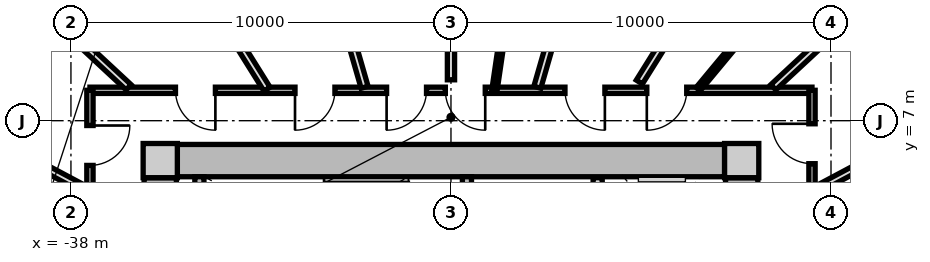
"""IFC4 building model, lengths in metres.
Left out: names, types, materials, properties, quantities, classifications, styles, units other than length and angle.
Written with IfcOpenShell. Run it as: python <this file> out.ifc"""

import sys

from ifc_helpers import new_model, si_unit, direction, frame, frame_2d, origin, origin_2d, place, context, subcontext, project, spatial, rectangle, extrude, source, transform, mapped, element, fill, save


model = new_model("IFC4")
c1 = context("Model", 3, precision=1e-05, world=origin(), true_north=direction((0.0, 1.0)))
c2 = subcontext(c1, "Body", "Model", "MODEL_VIEW")
j1 = project(units=[si_unit("LENGTHUNIT", "METRE"), si_unit("PLANEANGLEUNIT", "RADIAN")], contexts=[c1])
p1 = place(None, origin())
s1 = spatial("IfcSite", under=j1, at=p1, CompositionType="ELEMENT")
p2 = place(p1, origin())
s2 = spatial("IfcBuilding", under=s1, at=p2, CompositionType="ELEMENT")
p3 = place(p2, frame((0.0, 0.0, 55.15)))
s3 = spatial("IfcBuildingStorey", under=s2, at=p3, CompositionType="ELEMENT", Elevation=55.15)
m1 = source(origin(), c2, "Body", "SweptSolid", [
    extrude(rectangle(XDim=0.9, YDim=0.9, at=origin_2d()), origin(), (0.0, 0.0, 1.0), 3.05),
])
for number, where, z_axis, x_axis in (
    (1, (-20.35, 5.95, 0.0), (0.0, 0.0, 1.0), (1.0, 0.0, 0.0)),
    (2, (-35.65, 5.95, 0.0), (0.0, 0.0, 1.0), (1.0, 0.0, 0.0)),
):
    element("IfcColumn", number, at=place(p3, frame(where, z_axis=z_axis, x_axis=x_axis)), inside=s3, PredefinedType="COLUMN", context=c2, shape_type="MappedRepresentation", body=[
        mapped(m1, transform((0.0, 0.0, 0.0), x_axis=(1.0, 0.0, 0.0), y_axis=(0.0, 1.0, 0.0), z_axis=(0.0, 0.0, 1.0), scale=1.0)),
    ])
m2 = source(origin(), c2, "Body", "SweptSolid", [
    extrude(rectangle(XDim=14.4, YDim=0.85, at=frame_2d((7.2, 0.0))), origin(), (0.0, 0.0, 1.0), 2.79),
])
p4 = place(p3, frame((-35.2, 5.95, 0.0), z_axis=(0.0, 0.0, 1.0), x_axis=(1.0, 0.0, 0.0)))
e3 = element("IfcWall", 3, at=p4, inside=s3, PredefinedType="SHEAR", context=c2, shape_type="MappedRepresentation", body=[
    mapped(m2, transform((0.0, 0.0, 0.0), x_axis=(1.0, 0.0, 0.0), y_axis=(0.0, 1.0, 0.0), z_axis=(0.0, 0.0, 1.0), scale=1.0)),
])
m3 = source(origin(), c2, "Body", "SweptSolid", [
    extrude(rectangle(XDim=11.0, YDim=0.85, at=frame_2d((5.5, 0.0))), origin(), (0.0, 0.0, 1.0), 2.79),
])
p5 = place(p3, frame((-35.65, -5.5, 0.0), z_axis=(0.0, 0.0, 1.0), x_axis=(0.0, 1.0, 0.0)))
e4 = element("IfcWall", 4, at=p5, inside=s3, PredefinedType="SHEAR", context=c2, shape_type="MappedRepresentation", body=[
    mapped(m3, transform((0.0, 0.0, 0.0), x_axis=(1.0, 0.0, 0.0), y_axis=(0.0, 1.0, 0.0), z_axis=(0.0, 0.0, 1.0), scale=1.0)),
])
p6 = place(p5, frame((3.8, 0.0, 0.0)))
e5 = element("IfcOpeningElement", 5, at=p6, cuts=e4, PredefinedType="OPENING", context=c2, shape_type="SweptSolid", body=[
    extrude(rectangle(XDim=1.2, YDim=2.15, at=frame_2d((0.6, 1.075))), frame((0.0, 0.435, 0.0), z_axis=(0.0, -1.0, 0.0), x_axis=(1.0, 0.0, 0.0)), (0.0, 0.0, 1.0), 0.87),
])
p7 = place(p3, frame((-20.35, 5.5, 0.0), z_axis=(0.0, 0.0, 1.0), x_axis=(0.0, -1.0, 0.0)))
e6 = element("IfcWall", 6, at=p7, inside=s3, PredefinedType="SHEAR", context=c2, shape_type="MappedRepresentation", body=[
    mapped(m3, transform((0.0, 0.0, 0.0), x_axis=(1.0, 0.0, 0.0), y_axis=(0.0, 1.0, 0.0), z_axis=(0.0, 0.0, 1.0), scale=1.0)),
])
p8 = place(p7, frame((5.65, 0.0, 0.0)))
e7 = element("IfcOpeningElement", 7, at=p8, cuts=e6, PredefinedType="OPENING", context=c2, shape_type="SweptSolid", body=[
    extrude(rectangle(XDim=1.2, YDim=2.15, at=frame_2d((0.6, 1.075))), frame((0.0, 0.435, 0.0), z_axis=(0.0, -1.0, 0.0), x_axis=(1.0, 0.0, 0.0)), (0.0, 0.0, 1.0), 0.87),
])
p9 = place(p7, frame((9.3, 0.0, 0.0)))
e8 = element("IfcOpeningElement", 8, at=p9, cuts=e6, PredefinedType="OPENING", context=c2, shape_type="SweptSolid", body=[
    extrude(rectangle(XDim=1.0, YDim=2.1, at=frame_2d((0.5, 1.05))), frame((0.0, 0.435, 0.0), z_axis=(0.0, -1.0, 0.0), x_axis=(1.0, 0.0, 0.0)), (0.0, 0.0, 1.0), 0.87),
])
m4 = source(origin(), c2, "Body", "SweptSolid", [
    extrude(rectangle(XDim=3.075, YDim=0.24, at=frame_2d((1.538, 0.0))), origin(), (0.0, 0.0, 1.0), 2.79),
])
p10 = place(p3, frame((-34.62, 2.45, 0.0), z_axis=(0.0, 0.0, 1.0), x_axis=(0.0, 1.0, 0.0)))
e9 = element("IfcWall", 9, at=p10, inside=s3, PredefinedType="PARTITIONING", context=c2, shape_type="MappedRepresentation", body=[
    mapped(m4, transform((0.0, 0.0, 0.0), x_axis=(1.0, 0.0, 0.0), y_axis=(0.0, 1.0, 0.0), z_axis=(0.0, 0.0, 1.0), scale=1.0)),
])
p11 = place(p3, frame((-27.58, 2.45, 0.0), z_axis=(0.0, 0.0, 1.0), x_axis=(0.0, 1.0, 0.0)))
e10 = element("IfcWall", 10, at=p11, inside=s3, PredefinedType="PARTITIONING", context=c2, shape_type="MappedRepresentation", body=[
    mapped(m4, transform((0.0, 0.0, 0.0), x_axis=(1.0, 0.0, 0.0), y_axis=(0.0, 1.0, 0.0), z_axis=(0.0, 0.0, 1.0), scale=1.0)),
])
p12 = place(p11, frame((0.55, 0.0, 0.0)))
e11 = element("IfcOpeningElement", 11, at=p12, cuts=e10, PredefinedType="OPENING", context=c2, shape_type="SweptSolid", body=[
    extrude(rectangle(XDim=1.1, YDim=2.15, at=frame_2d((0.55, 1.075))), frame((0.0, 0.13, 0.0), z_axis=(0.0, -1.0, 0.0), x_axis=(1.0, 0.0, 0.0)), (0.0, 0.0, 1.0), 0.26),
])
m5 = source(origin(), c2, "Body", "SweptSolid", [
    extrude(rectangle(XDim=5.0, YDim=0.24, at=frame_2d((2.5, 0.0))), origin(), (0.0, 0.0, 1.0), 2.775),
])
p13 = place(p3, frame((-24.14, 0.5, 0.0), z_axis=(0.0, 0.0, 1.0), x_axis=(0.0, 1.0, 0.0)))
e12 = element("IfcWall", 12, at=p13, inside=s3, PredefinedType="PARTITIONING", context=c2, shape_type="MappedRepresentation", body=[
    mapped(m5, transform((0.0, 0.0, 0.0), x_axis=(1.0, 0.0, 0.0), y_axis=(0.0, 1.0, 0.0), z_axis=(0.0, 0.0, 1.0), scale=1.0)),
])
p14 = place(p13, frame((3.05, 0.0, 0.0)))
e13 = element("IfcOpeningElement", 13, at=p14, cuts=e12, PredefinedType="OPENING", context=c2, shape_type="SweptSolid", body=[
    extrude(rectangle(XDim=1.3, YDim=2.2, at=frame_2d((0.65, 1.1))), frame((0.0, 0.13, 0.0), z_axis=(0.0, -1.0, 0.0), x_axis=(1.0, 0.0, 0.0)), (0.0, 0.0, 1.0), 0.26),
])
p15 = place(p13, frame((0.55, 0.0, 0.0)))
e14 = element("IfcOpeningElement", 14, at=p15, cuts=e12, PredefinedType="OPENING", context=c2, shape_type="SweptSolid", body=[
    extrude(rectangle(XDim=1.3, YDim=2.2, at=frame_2d((0.65, 1.1))), frame((0.0, 0.13, 0.0), z_axis=(0.0, -1.0, 0.0), x_axis=(1.0, 0.0, 0.0)), (0.0, 0.0, 1.0), 0.26),
])
m6 = source(origin(), c2, "Body", "SweptSolid", [
    extrude(rectangle(XDim=19.0, YDim=0.165, at=frame_2d((9.5, 0.0))), origin(), (0.0, 0.0, 1.0), 2.775),
])
p16 = place(p3, frame((-37.5, 7.8, 0.0), z_axis=(0.0, 0.0, 1.0), x_axis=(1.0, 0.0, 0.0)))
e15 = element("IfcWall", 15, at=p16, inside=s3, PredefinedType="PARTITIONING", context=c2, shape_type="MappedRepresentation", body=[
    mapped(m6, transform((0.0, 0.0, 0.0), x_axis=(1.0, 0.0, 0.0), y_axis=(0.0, 1.0, 0.0), z_axis=(0.0, 0.0, 1.0), scale=1.0)),
])
p17 = place(p16, frame((14.653, 0.0, 0.0)))
e16 = element("IfcOpeningElement", 16, at=p17, cuts=e15, PredefinedType="OPENING", context=c2, shape_type="SweptSolid", body=[
    extrude(rectangle(XDim=1.05, YDim=2.15, at=frame_2d((0.525, 1.075))), frame((0.0, 0.093, 0.0), z_axis=(0.0, -1.0, 0.0), x_axis=(1.0, 0.0, 0.0)), (0.0, 0.0, 1.0), 0.185),
])
p18 = place(p16, frame((12.5, 0.0, 0.0)))
e17 = element("IfcOpeningElement", 17, at=p18, cuts=e15, PredefinedType="OPENING", context=c2, shape_type="SweptSolid", body=[
    extrude(rectangle(XDim=1.05, YDim=2.15, at=frame_2d((0.525, 1.075))), frame((0.0, 0.093, 0.0), z_axis=(0.0, -1.0, 0.0), x_axis=(1.0, 0.0, 0.0)), (0.0, 0.0, 1.0), 0.185),
])
p19 = place(p16, frame((9.352, 0.0, 0.0)))
e18 = element("IfcOpeningElement", 18, at=p19, cuts=e15, PredefinedType="OPENING", context=c2, shape_type="SweptSolid", body=[
    extrude(rectangle(XDim=1.05, YDim=2.15, at=frame_2d((0.525, 1.075))), frame((0.0, 0.093, 0.0), z_axis=(0.0, -1.0, 0.0), x_axis=(1.0, 0.0, 0.0)), (0.0, 0.0, 1.0), 0.185),
])
p20 = place(p16, frame((7.806, 0.0, 0.0)))
e19 = element("IfcOpeningElement", 19, at=p20, cuts=e15, PredefinedType="OPENING", context=c2, shape_type="SweptSolid", body=[
    extrude(rectangle(XDim=1.05, YDim=2.15, at=frame_2d((0.525, 1.075))), frame((0.0, 0.093, 0.0), z_axis=(0.0, -1.0, 0.0), x_axis=(1.0, 0.0, 0.0)), (0.0, 0.0, 1.0), 0.185),
])
p21 = place(p16, frame((5.396, 0.0, 0.0)))
e20 = element("IfcOpeningElement", 20, at=p21, cuts=e15, PredefinedType="OPENING", context=c2, shape_type="SweptSolid", body=[
    extrude(rectangle(XDim=1.05, YDim=2.15, at=frame_2d((0.525, 1.075))), frame((0.0, 0.093, 0.0), z_axis=(0.0, -1.0, 0.0), x_axis=(1.0, 0.0, 0.0)), (0.0, 0.0, 1.0), 0.185),
])
p22 = place(p16, frame((2.251, 0.0, 0.0)))
e21 = element("IfcOpeningElement", 21, at=p22, cuts=e15, PredefinedType="OPENING", context=c2, shape_type="SweptSolid", body=[
    extrude(rectangle(XDim=1.05, YDim=2.15, at=frame_2d((0.525, 1.075))), frame((0.0, 0.093, 0.0), z_axis=(0.0, -1.0, 0.0), x_axis=(1.0, 0.0, 0.0)), (0.0, 0.0, 1.0), 0.185),
])
m7 = source(origin(), c2, "Body", "SweptSolid", [
    extrude(rectangle(XDim=15.6, YDim=0.165, at=frame_2d((7.8, 0.0))), origin(), (0.0, 0.0, 1.0), 2.775),
])
p23 = place(p3, frame((-37.5, -7.8, 0.0), z_axis=(0.0, 0.0, 1.0), x_axis=(0.0, 1.0, 0.0)))
e22 = element("IfcWall", 22, at=p23, inside=s3, PredefinedType="PARTITIONING", context=c2, shape_type="MappedRepresentation", body=[
    mapped(m7, transform((0.0, 0.0, 0.0), x_axis=(1.0, 0.0, 0.0), y_axis=(0.0, 1.0, 0.0), z_axis=(0.0, 0.0, 1.0), scale=1.0)),
])
p24 = place(p23, frame((13.623, 0.0, 0.0)))
e23 = element("IfcOpeningElement", 23, at=p24, cuts=e22, PredefinedType="OPENING", context=c2, shape_type="SweptSolid", body=[
    extrude(rectangle(XDim=1.05, YDim=2.15, at=frame_2d((0.525, 1.075))), frame((0.0, 0.093, 0.0), z_axis=(0.0, -1.0, 0.0), x_axis=(1.0, 0.0, 0.0)), (0.0, 0.0, 1.0), 0.185),
])
p25 = place(p23, frame((11.018, 0.0, 0.0)))
e24 = element("IfcOpeningElement", 24, at=p25, cuts=e22, PredefinedType="OPENING", context=c2, shape_type="SweptSolid", body=[
    extrude(rectangle(XDim=1.05, YDim=2.15, at=frame_2d((0.525, 1.075))), frame((0.0, 0.093, 0.0), z_axis=(0.0, -1.0, 0.0), x_axis=(1.0, 0.0, 0.0)), (0.0, 0.0, 1.0), 0.185),
])
p26 = place(p23, frame((8.467, 0.0, 0.0)))
e25 = element("IfcOpeningElement", 25, at=p26, cuts=e22, PredefinedType="OPENING", context=c2, shape_type="SweptSolid", body=[
    extrude(rectangle(XDim=1.05, YDim=2.15, at=frame_2d((0.525, 1.075))), frame((0.0, 0.093, 0.0), z_axis=(0.0, -1.0, 0.0), x_axis=(1.0, 0.0, 0.0)), (0.0, 0.0, 1.0), 0.185),
])
p27 = place(p23, frame((6.035, 0.0, 0.0)))
e26 = element("IfcOpeningElement", 26, at=p27, cuts=e22, PredefinedType="OPENING", context=c2, shape_type="SweptSolid", body=[
    extrude(rectangle(XDim=1.05, YDim=2.15, at=frame_2d((0.525, 1.075))), frame((0.0, 0.093, 0.0), z_axis=(0.0, -1.0, 0.0), x_axis=(1.0, 0.0, 0.0)), (0.0, 0.0, 1.0), 0.185),
])
p28 = place(p23, frame((3.489, 0.0, 0.0)))
e27 = element("IfcOpeningElement", 27, at=p28, cuts=e22, PredefinedType="OPENING", context=c2, shape_type="SweptSolid", body=[
    extrude(rectangle(XDim=1.05, YDim=2.15, at=frame_2d((0.525, 1.075))), frame((0.0, 0.093, 0.0), z_axis=(0.0, -1.0, 0.0), x_axis=(1.0, 0.0, 0.0)), (0.0, 0.0, 1.0), 0.185),
])
p29 = place(p23, frame((0.882, 0.0, 0.0)))
e28 = element("IfcOpeningElement", 28, at=p29, cuts=e22, PredefinedType="OPENING", context=c2, shape_type="SweptSolid", body=[
    extrude(rectangle(XDim=1.05, YDim=2.15, at=frame_2d((0.525, 1.075))), frame((0.0, 0.093, 0.0), z_axis=(0.0, -1.0, 0.0), x_axis=(1.0, 0.0, 0.0)), (0.0, 0.0, 1.0), 0.185),
])
p30 = place(p3, frame((-18.5, 7.8, 0.0), z_axis=(0.0, 0.0, 1.0), x_axis=(0.0, -1.0, 0.0)))
e29 = element("IfcWall", 29, at=p30, inside=s3, PredefinedType="PARTITIONING", context=c2, shape_type="MappedRepresentation", body=[
    mapped(m7, transform((0.0, 0.0, 0.0), x_axis=(1.0, 0.0, 0.0), y_axis=(0.0, 1.0, 0.0), z_axis=(0.0, 0.0, 1.0), scale=1.0)),
])
p31 = place(p30, frame((12.141, 0.0, 0.0)))
e30 = element("IfcOpeningElement", 30, at=p31, cuts=e29, PredefinedType="OPENING", context=c2, shape_type="SweptSolid", body=[
    extrude(rectangle(XDim=1.25, YDim=2.2, at=frame_2d((0.625, 1.1))), frame((0.0, 0.093, 0.0), z_axis=(0.0, -1.0, 0.0), x_axis=(1.0, 0.0, 0.0)), (0.0, 0.0, 1.0), 0.185),
])
p32 = place(p30, frame((7.175, 0.0, 0.0)))
e31 = element("IfcOpeningElement", 31, at=p32, cuts=e29, PredefinedType="OPENING", context=c2, shape_type="SweptSolid", body=[
    extrude(rectangle(XDim=1.25, YDim=2.2, at=frame_2d((0.625, 1.1))), frame((0.0, 0.093, 0.0), z_axis=(0.0, -1.0, 0.0), x_axis=(1.0, 0.0, 0.0)), (0.0, 0.0, 1.0), 0.185),
])
p33 = place(p30, frame((2.826, 0.0, 0.0)))
e32 = element("IfcOpeningElement", 32, at=p33, cuts=e29, PredefinedType="OPENING", context=c2, shape_type="SweptSolid", body=[
    extrude(rectangle(XDim=1.05, YDim=2.15, at=frame_2d((0.525, 1.075))), frame((0.0, 0.093, 0.0), z_axis=(0.0, -1.0, 0.0), x_axis=(1.0, 0.0, 0.0)), (0.0, 0.0, 1.0), 0.185),
])
p34 = place(p30, frame((0.881, 0.0, 0.0)))
e33 = element("IfcOpeningElement", 33, at=p34, cuts=e29, PredefinedType="OPENING", context=c2, shape_type="SweptSolid", body=[
    extrude(rectangle(XDim=1.05, YDim=2.15, at=frame_2d((0.525, 1.075))), frame((0.0, 0.093, 0.0), z_axis=(0.0, -1.0, 0.0), x_axis=(1.0, 0.0, 0.0)), (0.0, 0.0, 1.0), 0.185),
])
m8 = source(origin(), c2, "Body", "SweptSolid", [
    extrude(rectangle(XDim=7.435, YDim=0.19, at=frame_2d((3.717, 0.0))), origin(), (0.0, 0.0, 1.0), 2.225),
])
p35 = place(p3, frame((-36.483, 7.88, 0.0), z_axis=(0.0, 0.0, 1.0), x_axis=(-0.732651956848, 0.680603489652, 0.0)))
e34 = element("IfcWall", 34, at=p35, inside=s3, PredefinedType="PARTITIONING", context=c2, shape_type="MappedRepresentation", body=[
    mapped(m8, transform((0.0, 0.0, 0.0), x_axis=(1.0, 0.0, 0.0), y_axis=(0.0, 1.0, 0.0), z_axis=(0.0, 0.0, 1.0), scale=1.0)),
])
m9 = source(origin(), c2, "Body", "SweptSolid", [
    extrude(rectangle(XDim=7.873, YDim=0.19, at=frame_2d((3.937, 0.0))), origin(), (0.0, 0.0, 1.0), 2.775),
])
p36 = place(p3, frame((-37.53, 5.138, 0.0), z_axis=(0.0, 0.0, 1.0), x_axis=(-0.882666052726, 0.470000680175, 0.0)))
e35 = element("IfcWall", 35, at=p36, inside=s3, PredefinedType="PARTITIONING", context=c2, shape_type="MappedRepresentation", body=[
    mapped(m9, transform((0.0, 0.0, 0.0), x_axis=(1.0, 0.0, 0.0), y_axis=(0.0, 1.0, 0.0), z_axis=(0.0, 0.0, 1.0), scale=1.0)),
])
p37 = place(p3, frame((-19.517, 7.88, 0.0), z_axis=(0.0, 0.0, 1.0), x_axis=(0.732651956848, 0.680603489652, 0.0)))
e36 = element("IfcWall", 36, at=p37, inside=s3, PredefinedType="PARTITIONING", context=c2, shape_type="MappedRepresentation", body=[
    mapped(m8, transform((0.0, 0.0, 0.0), x_axis=(1.0, 0.0, 0.0), y_axis=(0.0, 1.0, 0.0), z_axis=(0.0, 0.0, 1.0), scale=1.0)),
])
m10 = source(origin(), c2, "Body", "SweptSolid", [
    extrude(rectangle(XDim=7.677, YDim=0.19, at=frame_2d((3.838, 0.0))), origin(), (0.0, 0.0, 1.0), 2.775),
])
p38 = place(p3, frame((-18.297, 5.231, 0.0), z_axis=(0.0, 0.0, 1.0), x_axis=(0.882725057546, 0.469889851753, 0.0)))
e37 = element("IfcWall", 37, at=p38, inside=s3, PredefinedType="PARTITIONING", context=c2, shape_type="MappedRepresentation", body=[
    mapped(m10, transform((0.0, 0.0, 0.0), x_axis=(1.0, 0.0, 0.0), y_axis=(0.0, 1.0, 0.0), z_axis=(0.0, 0.0, 1.0), scale=1.0)),
])
m11 = source(origin(), c2, "Body", "SweptSolid", [
    extrude(rectangle(XDim=10.196, YDim=0.19, at=frame_2d((5.098, 0.0))), origin(), (0.0, 0.0, 1.0), 2.225),
])
p39 = place(p3, frame((-25.727, 7.88, 0.0), z_axis=(0.0, 0.0, 1.0), x_axis=(0.277136420347, 0.960830580549, 0.0)))
e38 = element("IfcWall", 38, at=p39, inside=s3, PredefinedType="PARTITIONING", context=c2, shape_type="MappedRepresentation", body=[
    mapped(m11, transform((0.0, 0.0, 0.0), x_axis=(1.0, 0.0, 0.0), y_axis=(0.0, 1.0, 0.0), z_axis=(0.0, 0.0, 1.0), scale=1.0)),
])
m12 = source(origin(), c2, "Body", "SweptSolid", [
    extrude(rectangle(XDim=8.598, YDim=0.19, at=frame_2d((4.299, 0.0))), origin(), (0.0, 0.0, 1.0), 2.775),
])
p40 = place(p3, frame((-23.043, 8.017, 0.0), z_axis=(0.0, 0.0, 1.0), x_axis=(0.530039776395, 0.847972779893, 0.0)))
e39 = element("IfcWall", 39, at=p40, inside=s3, PredefinedType="PARTITIONING", context=c2, shape_type="MappedRepresentation", body=[
    mapped(m12, transform((0.0, 0.0, 0.0), x_axis=(1.0, 0.0, 0.0), y_axis=(0.0, 1.0, 0.0), z_axis=(0.0, 0.0, 1.0), scale=1.0)),
])
m13 = source(origin(), c2, "Body", "SweptSolid", [
    extrude(rectangle(XDim=3.594, YDim=0.14, at=frame_2d((1.797, 0.0))), origin(), (0.0, 0.0, 1.0), 2.775),
])
p41 = place(p3, frame((-21.496, 7.83, 0.0), z_axis=(0.0, 0.0, 1.0), x_axis=(0.639001147083, 0.769205781326, 0.0)))
e40 = element("IfcWall", 40, at=p41, inside=s3, PredefinedType="PARTITIONING", context=c2, shape_type="MappedRepresentation", body=[
    mapped(m13, transform((0.0, 0.0, 0.0), x_axis=(1.0, 0.0, 0.0), y_axis=(0.0, 1.0, 0.0), z_axis=(0.0, 0.0, 1.0), scale=1.0)),
])
p42 = place(p41, frame((1.337, 0.0, 0.0)))
e41 = element("IfcOpeningElement", 41, at=p42, cuts=e40, PredefinedType="OPENING", context=c2, shape_type="SweptSolid", body=[
    extrude(rectangle(XDim=0.92, YDim=2.1, at=frame_2d((0.46, 1.05))), frame((0.0, 0.08, 0.0), z_axis=(0.0, -1.0, 0.0), x_axis=(1.0, 0.0, 0.0)), (0.0, 0.0, 1.0), 0.16),
])
p43 = place(p3, frame((-30.273, 7.88, 0.0), z_axis=(0.0, 0.0, 1.0), x_axis=(-0.277136420347, 0.960830580549, 0.0)))
e42 = element("IfcWall", 42, at=p43, inside=s3, PredefinedType="PARTITIONING", context=c2, shape_type="MappedRepresentation", body=[
    mapped(m11, transform((0.0, 0.0, 0.0), x_axis=(1.0, 0.0, 0.0), y_axis=(0.0, 1.0, 0.0), z_axis=(0.0, 0.0, 1.0), scale=1.0)),
])
m14 = source(origin(), c2, "Body", "SweptSolid", [
    extrude(rectangle(XDim=9.601, YDim=0.19, at=frame_2d((4.8, 0.0))), origin(), (0.0, 0.0, 1.0), 2.775),
])
p44 = place(p3, frame((-28.0, 8.076, 0.0), z_axis=(0.0, 0.0, 1.0), x_axis=(0.0, 1.0, 0.0)))
e43 = element("IfcWall", 43, at=p44, inside=s3, PredefinedType="PARTITIONING", context=c2, shape_type="MappedRepresentation", body=[
    mapped(m14, transform((0.0, 0.0, 0.0), x_axis=(1.0, 0.0, 0.0), y_axis=(0.0, 1.0, 0.0), z_axis=(0.0, 0.0, 1.0), scale=1.0)),
])
m15 = source(origin(), c2, "Body", "SweptSolid", [
    extrude(rectangle(XDim=5.37, YDim=0.14, at=frame_2d((2.685, 0.0))), origin(), (0.0, 0.0, 1.0), 2.775),
])
p45 = place(p3, frame((-26.851, 7.83, 0.0), z_axis=(0.0, 0.0, 1.0), x_axis=(0.145131397853, 0.989412389935, 0.0)))
e44 = element("IfcWall", 44, at=p45, inside=s3, PredefinedType="PARTITIONING", context=c2, shape_type="MappedRepresentation", body=[
    mapped(m15, transform((0.0, 0.0, 0.0), x_axis=(1.0, 0.0, 0.0), y_axis=(0.0, 1.0, 0.0), z_axis=(0.0, 0.0, 1.0), scale=1.0)),
])
p46 = place(p45, frame((2.225, 0.0, 0.0)))
e45 = element("IfcOpeningElement", 45, at=p46, cuts=e44, PredefinedType="OPENING", context=c2, shape_type="SweptSolid", body=[
    extrude(rectangle(XDim=0.92, YDim=2.1, at=frame_2d((0.46, 1.05))), frame((0.0, 0.08, 0.0), z_axis=(0.0, -1.0, 0.0), x_axis=(1.0, 0.0, 0.0)), (0.0, 0.0, 1.0), 0.16),
])
m16 = source(origin(), c2, "Body", "SweptSolid", [
    extrude(rectangle(XDim=8.818, YDim=0.19, at=frame_2d((4.409, 0.0))), origin(), (0.0, 0.0, 1.0), 2.775),
])
p47 = place(p3, frame((-32.841, 7.83, 0.0), z_axis=(0.0, 0.0, 1.0), x_axis=(-0.529931746109, 0.848040296487, 0.0)))
e46 = element("IfcWall", 46, at=p47, inside=s3, PredefinedType="PARTITIONING", context=c2, shape_type="MappedRepresentation", body=[
    mapped(m16, transform((0.0, 0.0, 0.0), x_axis=(1.0, 0.0, 0.0), y_axis=(0.0, 1.0, 0.0), z_axis=(0.0, 0.0, 1.0), scale=1.0)),
])
m17 = source(origin(), c2, "Body", "SweptSolid", [
    extrude(rectangle(XDim=1.05, YDim=2.15, at=frame_2d((0.525, 1.075))), frame((0.0, 0.025, 0.0), z_axis=(0.0, -1.0, 0.0), x_axis=(1.0, 0.0, 0.0)), (0.0, 0.0, 1.0), 0.05),
])
p48 = place(p24, frame((1.05, 0.0, 0.0), z_axis=(0.0, 0.0, 1.0), x_axis=(-1.0, 0.0, 0.0)))
e47 = element("IfcDoor", 47, at=p48, inside=s3, OperationType="SINGLE_SWING_LEFT", PredefinedType="DOOR", context=c2, shape_type="MappedRepresentation", body=[
    mapped(m17, transform((0.0, 0.0, 0.0), x_axis=(1.0, 0.0, 0.0), y_axis=(0.0, 1.0, 0.0), z_axis=(0.0, 0.0, 1.0), scale=1.0)),
])
fill(e23, e47)
p49 = place(p34, frame((1.05, 0.0, 0.0), z_axis=(0.0, 0.0, 1.0), x_axis=(-1.0, 0.0, 0.0)))
e48 = element("IfcDoor", 48, at=p49, inside=s3, OperationType="SINGLE_SWING_RIGHT", PredefinedType="DOOR", context=c2, shape_type="MappedRepresentation", body=[
    mapped(m17, transform((0.0, 0.0, 0.0), x_axis=(1.0, 0.0, 0.0), y_axis=(0.0, 1.0, 0.0), z_axis=(0.0, 0.0, 1.0), scale=1.0)),
])
fill(e33, e48)
p50 = place(p17, frame((1.05, 0.0, 0.0), z_axis=(0.0, 0.0, 1.0), x_axis=(-1.0, 0.0, 0.0)))
e49 = element("IfcDoor", 49, at=p50, inside=s3, OperationType="SINGLE_SWING_RIGHT", PredefinedType="DOOR", context=c2, shape_type="MappedRepresentation", body=[
    mapped(m17, transform((0.0, 0.0, 0.0), x_axis=(1.0, 0.0, 0.0), y_axis=(0.0, 1.0, 0.0), z_axis=(0.0, 0.0, 1.0), scale=1.0)),
])
fill(e16, e49)
p51 = place(p18, frame((1.05, 0.0, 0.0), z_axis=(0.0, 0.0, 1.0), x_axis=(-1.0, 0.0, 0.0)))
e50 = element("IfcDoor", 50, at=p51, inside=s3, OperationType="SINGLE_SWING_LEFT", PredefinedType="DOOR", context=c2, shape_type="MappedRepresentation", body=[
    mapped(m17, transform((0.0, 0.0, 0.0), x_axis=(1.0, 0.0, 0.0), y_axis=(0.0, 1.0, 0.0), z_axis=(0.0, 0.0, 1.0), scale=1.0)),
])
fill(e17, e50)
p52 = place(p19, frame((1.05, 0.0, 0.0), z_axis=(0.0, 0.0, 1.0), x_axis=(-1.0, 0.0, 0.0)))
e51 = element("IfcDoor", 51, at=p52, inside=s3, OperationType="SINGLE_SWING_LEFT", PredefinedType="DOOR", context=c2, shape_type="MappedRepresentation", body=[
    mapped(m17, transform((0.0, 0.0, 0.0), x_axis=(1.0, 0.0, 0.0), y_axis=(0.0, 1.0, 0.0), z_axis=(0.0, 0.0, 1.0), scale=1.0)),
])
fill(e18, e51)
p53 = place(p20, frame((1.05, 0.0, 0.0), z_axis=(0.0, 0.0, 1.0), x_axis=(-1.0, 0.0, 0.0)))
e52 = element("IfcDoor", 52, at=p53, inside=s3, OperationType="SINGLE_SWING_RIGHT", PredefinedType="DOOR", context=c2, shape_type="MappedRepresentation", body=[
    mapped(m17, transform((0.0, 0.0, 0.0), x_axis=(1.0, 0.0, 0.0), y_axis=(0.0, 1.0, 0.0), z_axis=(0.0, 0.0, 1.0), scale=1.0)),
])
fill(e19, e52)
p54 = place(p21, frame((1.05, 0.0, 0.0), z_axis=(0.0, 0.0, 1.0), x_axis=(-1.0, 0.0, 0.0)))
e53 = element("IfcDoor", 53, at=p54, inside=s3, OperationType="SINGLE_SWING_RIGHT", PredefinedType="DOOR", context=c2, shape_type="MappedRepresentation", body=[
    mapped(m17, transform((0.0, 0.0, 0.0), x_axis=(1.0, 0.0, 0.0), y_axis=(0.0, 1.0, 0.0), z_axis=(0.0, 0.0, 1.0), scale=1.0)),
])
fill(e20, e53)
p55 = place(p22, frame((1.05, 0.0, 0.0), z_axis=(0.0, 0.0, 1.0), x_axis=(-1.0, 0.0, 0.0)))
e54 = element("IfcDoor", 54, at=p55, inside=s3, OperationType="SINGLE_SWING_LEFT", PredefinedType="DOOR", context=c2, shape_type="MappedRepresentation", body=[
    mapped(m17, transform((0.0, 0.0, 0.0), x_axis=(1.0, 0.0, 0.0), y_axis=(0.0, 1.0, 0.0), z_axis=(0.0, 0.0, 1.0), scale=1.0)),
])
fill(e21, e54)
save(model, sys.argv[1])
